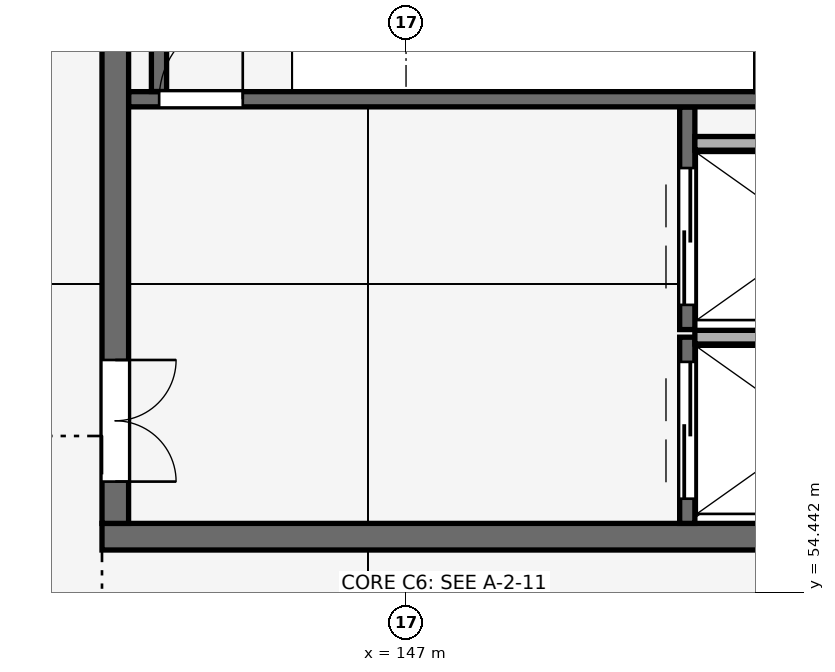
"""IFC4 building model, lengths in metres.
Left out: names, types, materials, properties, quantities, classifications, styles, units other than length and angle.
Written with IfcOpenShell. Run it as: python <this file> out.ifc"""

import sys

from ifc_helpers import new_model, si_unit, direction, frame, frame_2d, origin, place, context, subcontext, project, spatial, rectangle, extrude, element, fill, save


model = new_model("IFC4")
c1 = context("Model", 3, precision=1e-05, world=origin(), true_north=direction((0.0, 1.0)))
c2 = subcontext(c1, "Body", "Model", "MODEL_VIEW")
j1 = project(units=[si_unit("LENGTHUNIT", "METRE"), si_unit("PLANEANGLEUNIT", "RADIAN")], contexts=[c1])
p1 = place(None, origin())
s1 = spatial("IfcSite", under=j1, at=p1, CompositionType="ELEMENT")
p2 = place(p1, origin())
s2 = spatial("IfcBuilding", under=s1, at=p2, CompositionType="ELEMENT")
p3 = place(p2, origin())
s3 = spatial("IfcBuildingStorey", under=s2, at=p3, CompositionType="ELEMENT", Elevation=0.0)
p4 = place(p3, frame((143.0, 55.175, 0.0), z_axis=(0.0, 0.0, 1.0), x_axis=(1.0, 0.0, 0.0)))
e1 = element("IfcWall", 1, at=p4, inside=s3, PredefinedType="SHEAR", context=c2, shape_type="SweptSolid", body=[
    extrude(rectangle(XDim=11.4, YDim=0.35, at=frame_2d((5.7, 0.0))), origin(), (0.0, 0.0, 1.0), 5.4),
])
p5 = place(p3, frame((143.175, 55.35, 0.0), z_axis=(0.0, 0.0, 1.0), x_axis=(0.0, 1.0, 0.0)))
e2 = element("IfcWall", 2, at=p5, inside=s3, PredefinedType="SHEAR", context=c2, shape_type="SweptSolid", body=[
    extrude(rectangle(XDim=9.3, YDim=0.35, at=frame_2d((4.65, 0.0))), origin(), (0.0, 0.0, 1.0), 5.4),
])
p6 = place(p5, frame((0.55, 0.0, 0.0)))
e3 = element("IfcOpeningElement", 3, at=p6, cuts=e2, PredefinedType="OPENING", context=c2, shape_type="SweptSolid", body=[
    extrude(rectangle(XDim=1.6, YDim=2.2, at=frame_2d((0.8, 1.1))), frame((0.0, 0.185, 0.0), z_axis=(0.0, -1.0, 0.0), x_axis=(1.0, 0.0, 0.0)), (0.0, 0.0, 1.0), 0.37),
])
p7 = place(p3, frame((150.7, 55.35, 0.0), z_axis=(0.0, 0.0, 1.0), x_axis=(0.0, 1.0, 0.0)))
e4 = element("IfcWall", 4, at=p7, inside=s3, PredefinedType="SHEAR", context=c2, shape_type="SweptSolid", body=[
    extrude(rectangle(XDim=2.45, YDim=0.2, at=frame_2d((1.225, 0.0))), origin(), (0.0, 0.0, 1.0), 5.12),
])
p8 = place(p7, frame((0.325, 0.0, 0.0)))
e5 = element("IfcOpeningElement", 5, at=p8, cuts=e4, PredefinedType="OPENING", context=c2, shape_type="SweptSolid", body=[
    extrude(rectangle(XDim=1.8, YDim=2.4, at=frame_2d((0.9, 1.2))), frame((0.0, 0.11, 0.0), z_axis=(0.0, -1.0, 0.0), x_axis=(1.0, 0.0, 0.0)), (0.0, 0.0, 1.0), 0.22),
])
p9 = place(p3, frame((150.8, 57.8, 0.0), z_axis=(0.0, 0.0, 1.0), x_axis=(1.0, 0.0, 0.0)))
e6 = element("IfcWall", 6, at=p9, inside=s3, PredefinedType="PARTITIONING", context=c2, shape_type="SweptSolid", body=[
    extrude(rectangle(XDim=3.15, YDim=0.18, at=frame_2d((1.575, 0.0))), origin(), (0.0, 0.0, 1.0), 5.4),
])
p10 = place(p3, frame((150.7, 57.9, 0.0), z_axis=(0.0, 0.0, 1.0), x_axis=(0.0, 1.0, 0.0)))
e7 = element("IfcWall", 7, at=p10, inside=s3, PredefinedType="SHEAR", context=c2, shape_type="SweptSolid", body=[
    extrude(rectangle(XDim=2.928, YDim=0.2, at=frame_2d((1.464, 0.0))), origin(), (0.0, 0.0, 1.0), 5.12),
])
p11 = place(p10, frame((0.325, 0.0, 0.0)))
e8 = element("IfcOpeningElement", 8, at=p11, cuts=e7, PredefinedType="OPENING", context=c2, shape_type="SweptSolid", body=[
    extrude(rectangle(XDim=1.8, YDim=2.4, at=frame_2d((0.9, 1.2))), frame((0.0, 0.11, 0.0), z_axis=(0.0, -1.0, 0.0), x_axis=(1.0, 0.0, 0.0)), (0.0, 0.0, 1.0), 0.22),
])
p12 = place(p3, frame((150.8, 60.35, 0.0), z_axis=(0.0, 0.0, 1.0), x_axis=(1.0, 0.0, 0.0)))
e9 = element("IfcWall", 9, at=p12, inside=s3, PredefinedType="PARTITIONING", context=c2, shape_type="SweptSolid", body=[
    extrude(rectangle(XDim=3.15, YDim=0.18, at=frame_2d((1.575, 0.0))), origin(), (0.0, 0.0, 1.0), 5.4),
])
p13 = place(p3, frame((143.352, 60.93, 0.0), z_axis=(0.0, 0.0, 1.0), x_axis=(1.0, 0.0, 0.0)))
e10 = element("IfcWall", 10, at=p13, inside=s3, PredefinedType="SHEAR", context=c2, shape_type="SweptSolid", body=[
    extrude(rectangle(XDim=8.348, YDim=0.2, at=frame_2d((4.174, 0.0))), origin(), (0.0, 0.0, 1.0), 5.4),
])
p14 = place(p13, frame((0.4, 0.0, 0.0)))
e11 = element("IfcOpeningElement", 11, at=p14, cuts=e10, PredefinedType="OPENING", context=c2, shape_type="SweptSolid", body=[
    extrude(rectangle(XDim=1.1, YDim=2.15, at=frame_2d((0.55, 1.075))), frame((0.0, 0.11, 0.0), z_axis=(0.0, -1.0, 0.0), x_axis=(1.0, 0.0, 0.0)), (0.0, 0.0, 1.0), 0.22),
])
for number, where, z_axis, x_axis in (
    (12, (143.75, 61.032, 0.0), (0.0, 0.0, 1.0), (0.0, 1.0, 0.0)),
    (13, (151.7, 61.032, 0.0), (0.0, 0.0, 1.0), (0.0, 1.0, 0.0)),
):
    element("IfcWall", number, at=place(p3, frame(where, z_axis=z_axis, x_axis=x_axis)), inside=s3, PredefinedType="SHEAR", context=c2, shape_type="SweptSolid", body=[
        extrude(rectangle(XDim=3.586, YDim=0.2, at=frame_2d((1.793, 0.0))), origin(), (0.0, 0.0, 1.0), 5.4),
    ])
p15 = place(p8, origin())
e14 = element("IfcDoor", 14, at=p15, inside=s3, OperationType="DOUBLE_DOOR_SLIDING", PredefinedType="DOOR", context=c2, shape_type="SweptSolid", body=[
    extrude(rectangle(XDim=1.8, YDim=2.4, at=frame_2d((0.9, 1.2))), frame((0.0, 0.025, 0.0), z_axis=(0.0, -1.0, 0.0), x_axis=(1.0, 0.0, 0.0)), (0.0, 0.0, 1.0), 0.05),
])
fill(e5, e14)
p16 = place(p11, origin())
e15 = element("IfcDoor", 15, at=p16, inside=s3, OperationType="DOUBLE_DOOR_SLIDING", PredefinedType="DOOR", context=c2, shape_type="SweptSolid", body=[
    extrude(rectangle(XDim=1.8, YDim=2.4, at=frame_2d((0.9, 1.2))), frame((0.0, 0.025, 0.0), z_axis=(0.0, -1.0, 0.0), x_axis=(1.0, 0.0, 0.0)), (0.0, 0.0, 1.0), 0.05),
])
fill(e8, e15)
p17 = place(p14, frame((1.1, 0.0, 0.0), z_axis=(0.0, 0.0, 1.0), x_axis=(-1.0, 0.0, 0.0)))
e16 = element("IfcDoor", 16, at=p17, inside=s3, OperationType="SINGLE_SWING_LEFT", PredefinedType="DOOR", context=c2, shape_type="SweptSolid", body=[
    extrude(rectangle(XDim=1.1, YDim=2.15, at=frame_2d((0.55, 1.075))), frame((0.0, 0.025, 0.0), z_axis=(0.0, -1.0, 0.0), x_axis=(1.0, 0.0, 0.0)), (0.0, 0.0, 1.0), 0.05),
])
fill(e11, e16)
p18 = place(p6, frame((1.6, 0.0, 0.0), z_axis=(0.0, 0.0, 1.0), x_axis=(-1.0, 0.0, 0.0)))
e17 = element("IfcDoor", 17, at=p18, inside=s3, OperationType="DOUBLE_DOOR_SINGLE_SWING", PredefinedType="DOOR", context=c2, shape_type="SweptSolid", body=[
    extrude(rectangle(XDim=1.6, YDim=2.2, at=frame_2d((0.8, 1.1))), frame((0.0, 0.025, 0.0), z_axis=(0.0, -1.0, 0.0), x_axis=(1.0, 0.0, 0.0)), (0.0, 0.0, 1.0), 0.05),
])
fill(e3, e17)
save(model, sys.argv[1])
